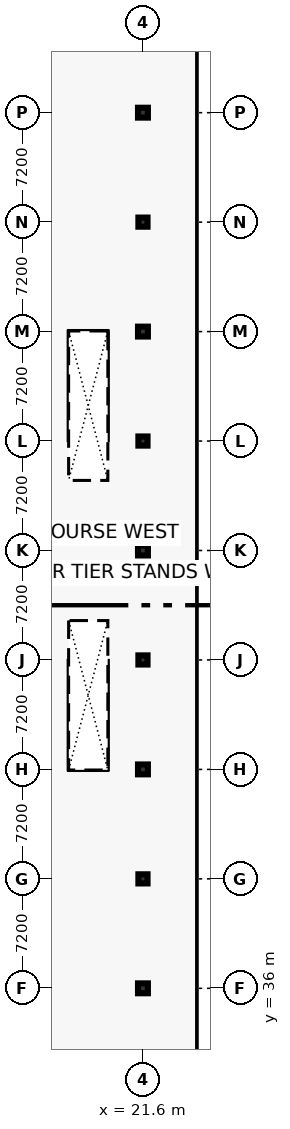
"""IFC4 building model, lengths in metres.
Left out: names, types, materials, properties, quantities, classifications, styles, units other than length and angle.
Written with IfcOpenShell. Run it as: python <this file> out.ifc"""

import sys

from ifc_helpers import new_model, si_unit, direction, frame, origin, origin_2d, place, context, subcontext, project, spatial, rectangle, extrude, element, save


model = new_model("IFC4")
c1 = context("Model", 3, precision=1e-05, world=origin(), true_north=direction((0.0, 1.0)))
c2 = subcontext(c1, "Body", "Model", "MODEL_VIEW")
j1 = project(units=[si_unit("LENGTHUNIT", "METRE"), si_unit("PLANEANGLEUNIT", "RADIAN")], contexts=[c1])
p1 = place(None, origin())
s1 = spatial("IfcSite", under=j1, at=p1, CompositionType="ELEMENT")
p2 = place(p1, origin())
s2 = spatial("IfcBuilding", under=s1, at=p2, CompositionType="ELEMENT")
p3 = place(p2, frame((0.0, 0.0, 13.8)))
s3 = spatial("IfcBuildingStorey", under=s2, at=p3, CompositionType="ELEMENT", Elevation=13.8)
p4 = place(p3, frame((21.6, 36.0, 0.0), z_axis=(0.0, 0.0, 1.0), x_axis=(1.0, 0.0, 0.0)))
e1 = element("IfcColumn", 1, at=p4, inside=s3, PredefinedType="COLUMN", context=c2, shape_type="SweptSolid", body=[
    extrude(rectangle(XDim=0.65, YDim=0.65, at=origin_2d()), origin(), (0.0, 0.0, 1.0), 4.8),
])
p5 = place(p3, frame((21.6, 43.2, 0.0), z_axis=(0.0, 0.0, 1.0), x_axis=(1.0, 0.0, 0.0)))
e2 = element("IfcColumn", 2, at=p5, inside=s3, PredefinedType="COLUMN", context=c2, shape_type="SweptSolid", body=[
    extrude(rectangle(XDim=0.6, YDim=0.6, at=origin_2d()), origin(), (0.0, 0.0, 1.0), 4.8),
])
p6 = place(p3, frame((21.6, 50.4, 0.0), z_axis=(0.0, 0.0, 1.0), x_axis=(1.0, 0.0, 0.0)))
e3 = element("IfcColumn", 3, at=p6, inside=s3, PredefinedType="COLUMN", context=c2, shape_type="SweptSolid", body=[
    extrude(rectangle(XDim=0.65, YDim=0.65, at=origin_2d()), origin(), (0.0, 0.0, 1.0), 4.8),
])
p7 = place(p3, frame((21.6, 57.6, 0.0), z_axis=(0.0, 0.0, 1.0), x_axis=(1.0, 0.0, 0.0)))
e4 = element("IfcColumn", 4, at=p7, inside=s3, PredefinedType="COLUMN", context=c2, shape_type="SweptSolid", body=[
    extrude(rectangle(XDim=0.6, YDim=0.6, at=origin_2d()), origin(), (0.0, 0.0, 1.0), 4.8),
])
p8 = place(p3, frame((21.6, 64.8, 0.0), z_axis=(0.0, 0.0, 1.0), x_axis=(1.0, 0.0, 0.0)))
e5 = element("IfcColumn", 5, at=p8, inside=s3, PredefinedType="COLUMN", context=c2, shape_type="SweptSolid", body=[
    extrude(rectangle(XDim=0.65, YDim=0.65, at=origin_2d()), origin(), (0.0, 0.0, 1.0), 4.8),
])
p9 = place(p3, frame((21.6, 72.0, 0.0), z_axis=(0.0, 0.0, 1.0), x_axis=(1.0, 0.0, 0.0)))
e6 = element("IfcColumn", 6, at=p9, inside=s3, PredefinedType="COLUMN", context=c2, shape_type="SweptSolid", body=[
    extrude(rectangle(XDim=0.6, YDim=0.6, at=origin_2d()), origin(), (0.0, 0.0, 1.0), 4.8),
])
p10 = place(p3, frame((21.6, 79.2, 0.0), z_axis=(0.0, 0.0, 1.0), x_axis=(1.0, 0.0, 0.0)))
e7 = element("IfcColumn", 7, at=p10, inside=s3, PredefinedType="COLUMN", context=c2, shape_type="SweptSolid", body=[
    extrude(rectangle(XDim=0.65, YDim=0.65, at=origin_2d()), origin(), (0.0, 0.0, 1.0), 4.8),
])
p11 = place(p3, frame((21.6, 86.4, 0.0), z_axis=(0.0, 0.0, 1.0), x_axis=(1.0, 0.0, 0.0)))
e8 = element("IfcColumn", 8, at=p11, inside=s3, PredefinedType="COLUMN", context=c2, shape_type="SweptSolid", body=[
    extrude(rectangle(XDim=0.6, YDim=0.6, at=origin_2d()), origin(), (0.0, 0.0, 1.0), 4.8),
])
p12 = place(p3, frame((21.6, 93.6, 0.0), z_axis=(0.0, 0.0, 1.0), x_axis=(1.0, 0.0, 0.0)))
e9 = element("IfcColumn", 9, at=p12, inside=s3, PredefinedType="COLUMN", context=c2, shape_type="SweptSolid", body=[
    extrude(rectangle(XDim=0.65, YDim=0.65, at=origin_2d()), origin(), (0.0, 0.0, 1.0), 4.8),
])
save(model, sys.argv[1])
